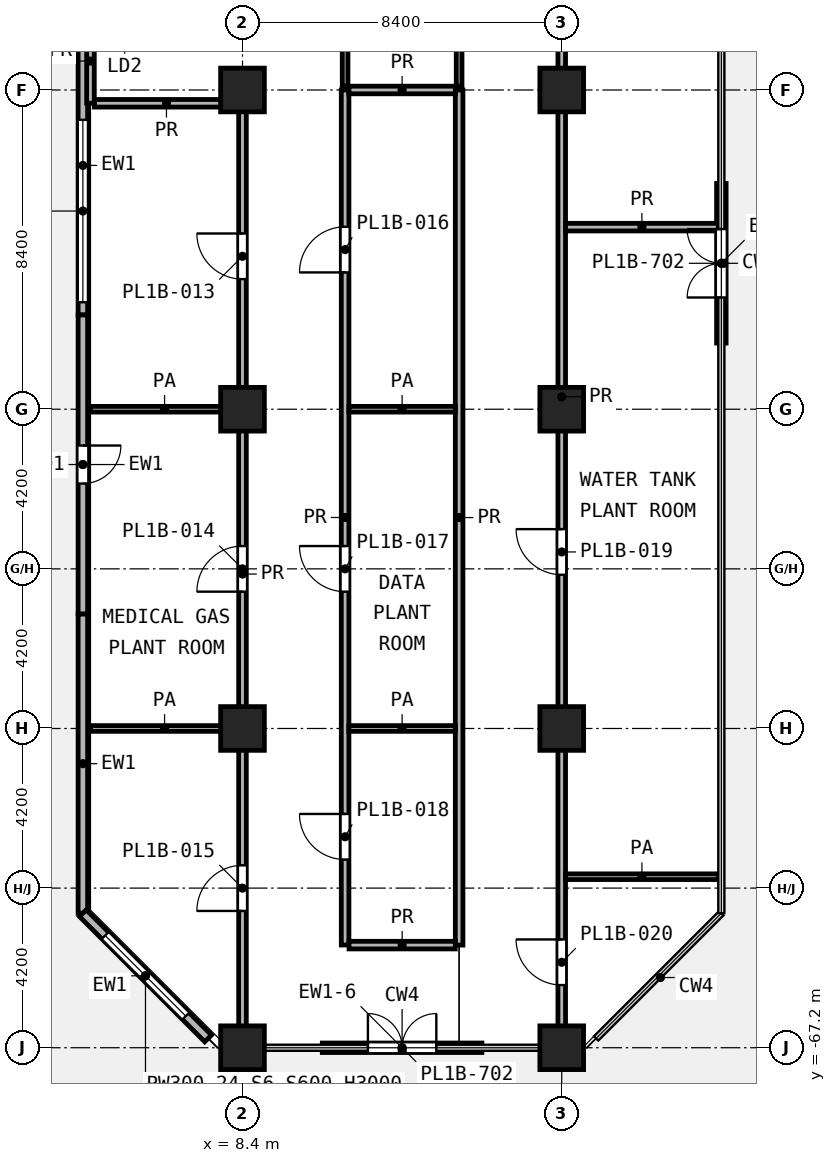
"""IFC4 building model, lengths in metres.
Left out: names, types, materials, properties, quantities, classifications, styles, units other than length and angle.
Written with IfcOpenShell. Run it as: python <this file> out.ifc"""

import sys

from ifc_helpers import new_model, si_unit, direction, frame, frame_2d, origin, origin_2d, place, context, subcontext, project, spatial, rectangle, extrude, element, fill, save


model = new_model("IFC4")
c1 = context("Model", 3, precision=1e-05, world=origin(), true_north=direction((0.0, 1.0)))
c2 = subcontext(c1, "Body", "Model", "MODEL_VIEW")
j1 = project(units=[si_unit("LENGTHUNIT", "METRE"), si_unit("PLANEANGLEUNIT", "RADIAN")], contexts=[c1])
p1 = place(None, origin())
s1 = spatial("IfcSite", under=j1, at=p1, CompositionType="ELEMENT")
p2 = place(p1, origin())
s2 = spatial("IfcBuilding", under=s1, at=p2, CompositionType="ELEMENT")
p3 = place(p2, frame((0.0, 0.0, 93.8)))
s3 = spatial("IfcBuildingStorey", under=s2, at=p3, CompositionType="ELEMENT", Elevation=93.8)
for number, where, z_axis, x_axis in (
    (1, (8.4, -42.0, 0.0), (0.0, 0.0, 1.0), (1.0, 0.0, 0.0)),
    (2, (16.8, -42.0, 0.0), (0.0, 0.0, 1.0), (1.0, 0.0, 0.0)),
    (3, (8.4, -50.4, 0.0), (0.0, 0.0, 1.0), (1.0, 0.0, 0.0)),
    (4, (16.8, -50.4, 0.0), (0.0, 0.0, 1.0), (1.0, 0.0, 0.0)),
    (5, (8.4, -58.8, 0.0), (0.0, 0.0, 1.0), (1.0, 0.0, 0.0)),
    (6, (16.8, -58.8, 0.0), (0.0, 0.0, 1.0), (1.0, 0.0, 0.0)),
    (7, (8.4, -67.2, 0.0), (0.0, 0.0, 1.0), (1.0, 0.0, 0.0)),
    (8, (16.8, -67.2, 0.0), (0.0, 0.0, 1.0), (1.0, 0.0, 0.0)),
):
    element("IfcColumn", number, at=place(p3, frame(where, z_axis=z_axis, x_axis=x_axis)), inside=s3, PredefinedType="COLUMN", context=c2, shape_type="SweptSolid", body=[
        extrude(rectangle(XDim=1.15, YDim=1.15, at=origin_2d()), origin(), (0.0, 0.0, 1.0), 5.0),
    ])
p4 = place(p3, frame((4.2, -40.05, 0.0), z_axis=(0.0, 0.0, 1.0), x_axis=(0.0, -1.0, 0.0)))
e9 = element("IfcWall", 9, at=p4, inside=s3, PredefinedType="SOLIDWALL", context=c2, shape_type="SweptSolid", body=[
    extrude(rectangle(XDim=7.87, YDim=0.25, at=frame_2d((3.935, 0.0))), origin(), (0.0, 0.0, 1.0), 4.4),
])
p5 = place(p4, frame((2.735, 0.0, 0.6)))
e10 = element("IfcOpeningElement", 10, at=p5, cuts=e9, PredefinedType="OPENING", context=c2, shape_type="SweptSolid", body=[
    extrude(rectangle(XDim=4.8, YDim=2.4, at=frame_2d((2.4, 1.2))), frame((0.0, 0.135, 0.0), z_axis=(0.0, -1.0, 0.0), x_axis=(1.0, 0.0, 0.0)), (0.0, 0.0, 1.0), 0.27),
])
p6 = place(p3, frame((4.2, -47.92, 0.0), z_axis=(0.0, 0.0, 1.0), x_axis=(0.0, -1.0, 0.0)))
e11 = element("IfcWall", 11, at=p6, inside=s3, PredefinedType="SOLIDWALL", context=c2, shape_type="SweptSolid", body=[
    extrude(rectangle(XDim=7.87, YDim=0.25, at=frame_2d((3.935, 0.0))), origin(), (0.0, 0.0, 1.0), 4.4),
])
p7 = place(p6, frame((3.435, 0.0, 0.0)))
e12 = element("IfcOpeningElement", 12, at=p7, cuts=e11, PredefinedType="OPENING", context=c2, shape_type="SweptSolid", body=[
    extrude(rectangle(XDim=1.0, YDim=2.1, at=frame_2d((0.5, 1.05))), frame((0.0, 0.135, 0.0), z_axis=(0.0, -1.0, 0.0), x_axis=(1.0, 0.0, 0.0)), (0.0, 0.0, 1.0), 0.27),
])
p8 = place(p3, frame((4.2, -55.79, 0.0), z_axis=(0.0, 0.0, 1.0), x_axis=(0.0, -1.0, 0.0)))
e13 = element("IfcWall", 13, at=p8, inside=s3, PredefinedType="SOLIDWALL", context=c2, shape_type="SweptSolid", body=[
    extrude(rectangle(XDim=7.87, YDim=0.25, at=frame_2d((3.935, 0.0))), origin(), (0.0, 0.0, 1.0), 4.4),
])
p9 = place(p3, frame((4.2, -63.66, 0.0), z_axis=(0.0, 0.0, 1.0), x_axis=(0.707106781187, -0.707106781187, 0.0)))
e14 = element("IfcWall", 14, at=p9, inside=s3, PredefinedType="SOLIDWALL", context=c2, shape_type="SweptSolid", body=[
    extrude(rectangle(XDim=4.66, YDim=0.25, at=frame_2d((2.33, 0.0))), origin(), (0.0, 0.0, 1.0), 4.4),
])
p10 = place(p9, frame((0.83, 0.0, 0.6)))
e15 = element("IfcOpeningElement", 15, at=p10, cuts=e14, PredefinedType="OPENING", context=c2, shape_type="SweptSolid", body=[
    extrude(rectangle(XDim=3.0, YDim=2.4, at=frame_2d((1.5, 1.2))), frame((0.0, 0.135, 0.0), z_axis=(0.0, -1.0, 0.0), x_axis=(1.0, 0.0, 0.0)), (0.0, 0.0, 1.0), 0.27),
])
p11 = place(p3, frame((10.5, -67.201, 0.0), z_axis=(0.0, 0.0, 1.0), x_axis=(1.0, 0.0, 0.0)))
e16 = element("IfcWall", 16, at=p11, inside=s3, PredefinedType="SOLIDWALL", context=c2, shape_type="SweptSolid", body=[
    extrude(rectangle(XDim=4.2, YDim=0.25, at=frame_2d((2.1, 0.0))), origin(), (0.0, 0.0, 1.0), 4.24),
])
p12 = place(p11, frame((1.2, 0.0, 0.0)))
e17 = element("IfcOpeningElement", 17, at=p12, cuts=e16, PredefinedType="OPENING", context=c2, shape_type="SweptSolid", body=[
    extrude(rectangle(XDim=1.8, YDim=2.1, at=frame_2d((0.9, 1.05))), frame((0.0, 0.135, 0.0), z_axis=(0.0, -1.0, 0.0), x_axis=(1.0, 0.0, 0.0)), (0.0, 0.0, 1.0), 0.27),
])
p13 = place(p3, frame((21.0, -48.66, 0.0), z_axis=(0.0, 0.0, 1.0), x_axis=(0.0, 1.0, 0.0)))
e18 = element("IfcWall", 18, at=p13, inside=s3, PredefinedType="SOLIDWALL", context=c2, shape_type="SweptSolid", body=[
    extrude(rectangle(XDim=4.2, YDim=0.25, at=frame_2d((2.1, 0.0))), origin(), (0.0, 0.0, 1.0), 4.24),
])
p14 = place(p13, frame((1.2, 0.0, 0.0)))
e19 = element("IfcOpeningElement", 19, at=p14, cuts=e18, PredefinedType="OPENING", context=c2, shape_type="SweptSolid", body=[
    extrude(rectangle(XDim=1.8, YDim=2.1, at=frame_2d((0.9, 1.05))), frame((0.0, 0.135, 0.0), z_axis=(0.0, -1.0, 0.0), x_axis=(1.0, 0.0, 0.0)), (0.0, 0.0, 1.0), 0.27),
])
p15 = place(p3, frame((16.9, -62.7, 0.0), z_axis=(0.0, 0.0, 1.0), x_axis=(1.0, 0.0, 0.0)))
e20 = element("IfcWall", 20, at=p15, inside=s3, PredefinedType="PARTITIONING", context=c2, shape_type="SweptSolid", body=[
    extrude(rectangle(XDim=4.02, YDim=0.15, at=frame_2d((2.01, 0.0))), origin(), (0.0, 0.0, 1.0), 4.4),
])
p16 = place(p3, frame((4.4, -58.8, 0.0), z_axis=(0.0, 0.0, 1.0), x_axis=(1.0, 0.0, 0.0)))
e21 = element("IfcWall", 21, at=p16, inside=s3, PredefinedType="PARTITIONING", context=c2, shape_type="SweptSolid", body=[
    extrude(rectangle(XDim=3.9, YDim=0.15, at=frame_2d((1.95, 0.0))), origin(), (0.0, 0.0, 1.0), 4.4),
])
p17 = place(p3, frame((11.2, -58.8, 0.0), z_axis=(0.0, 0.0, 1.0), x_axis=(1.0, 0.0, 0.0)))
e22 = element("IfcWall", 22, at=p17, inside=s3, PredefinedType="PARTITIONING", context=c2, shape_type="SweptSolid", body=[
    extrude(rectangle(XDim=2.8, YDim=0.15, at=frame_2d((1.4, 0.0))), origin(), (0.0, 0.0, 1.0), 4.4),
])
p18 = place(p3, frame((4.4, -50.4, 0.0), z_axis=(0.0, 0.0, 1.0), x_axis=(1.0, 0.0, 0.0)))
e23 = element("IfcWall", 23, at=p18, inside=s3, PredefinedType="PARTITIONING", context=c2, shape_type="SweptSolid", body=[
    extrude(rectangle(XDim=3.9, YDim=0.15, at=frame_2d((1.95, 0.0))), origin(), (0.0, 0.0, 1.0), 4.4),
])
p19 = place(p3, frame((11.2, -50.4, 0.0), z_axis=(0.0, 0.0, 1.0), x_axis=(1.0, 0.0, 0.0)))
e24 = element("IfcWall", 24, at=p19, inside=s3, PredefinedType="PARTITIONING", context=c2, shape_type="SweptSolid", body=[
    extrude(rectangle(XDim=2.8, YDim=0.15, at=frame_2d((1.4, 0.0))), origin(), (0.0, 0.0, 1.0), 4.4),
])
p20 = place(p3, frame((11.1, -41.9, 0.0), z_axis=(0.0, 0.0, 1.0), x_axis=(0.0, 1.0, 0.0)))
e25 = element("IfcWall", 25, at=p20, inside=s3, PredefinedType="PARTITIONING", context=c2, shape_type="SweptSolid", body=[
    extrude(rectangle(XDim=12.497, YDim=0.15, at=frame_2d((6.249, 0.0))), origin(), (0.0, 0.0, 1.0), 4.4),
])
p21 = place(p20, frame((5.699, 0.0, 0.0)))
e26 = element("IfcOpeningElement", 26, at=p21, cuts=e25, PredefinedType="OPENING", context=c2, shape_type="SweptSolid", body=[
    extrude(rectangle(XDim=1.0, YDim=2.1, at=frame_2d((0.5, 1.05))), frame((0.0, 0.085, 0.0), z_axis=(0.0, -1.0, 0.0), x_axis=(1.0, 0.0, 0.0)), (0.0, 0.0, 1.0), 0.17),
])
p22 = place(p3, frame((14.1, -41.9, 0.0), z_axis=(0.0, 0.0, 1.0), x_axis=(0.0, 1.0, 0.0)))
e27 = element("IfcWall", 27, at=p22, inside=s3, PredefinedType="PARTITIONING", context=c2, shape_type="SweptSolid", body=[
    extrude(rectangle(XDim=12.5, YDim=0.15, at=frame_2d((6.25, 0.0))), origin(), (0.0, 0.0, 1.0), 4.4),
])
p23 = place(p3, frame((11.203, -64.5, 0.0), z_axis=(0.0, 0.0, 1.0), x_axis=(1.0, 0.0, 0.0)))
e28 = element("IfcWall", 28, at=p23, inside=s3, PredefinedType="PARTITIONING", context=c2, shape_type="SweptSolid", body=[
    extrude(rectangle(XDim=2.797, YDim=0.2, at=frame_2d((1.398, 0.0))), origin(), (0.0, 0.0, 1.0), 4.4),
])
p24 = place(p3, frame((16.9, -45.609, 0.0), z_axis=(0.0, 0.0, 1.0), x_axis=(1.0, 0.0, 0.0)))
e29 = element("IfcWall", 29, at=p24, inside=s3, PredefinedType="PARTITIONING", context=c2, shape_type="SweptSolid", body=[
    extrude(rectangle(XDim=4.02, YDim=0.2, at=frame_2d((2.01, 0.0))), origin(), (0.0, 0.0, 1.0), 4.4),
])
p25 = place(p3, frame((4.501, -42.35, 0.0), z_axis=(0.0, 0.0, 1.0), x_axis=(1.0, 0.0, 0.0)))
e30 = element("IfcWall", 30, at=p25, inside=s3, PredefinedType="PARTITIONING", context=c2, shape_type="SweptSolid", body=[
    extrude(rectangle(XDim=3.797, YDim=0.2, at=frame_2d((1.898, 0.0))), origin(), (0.0, 0.0, 1.0), 4.4),
])
p26 = place(p3, frame((11.2, -42.0, 0.0), z_axis=(0.0, 0.0, 1.0), x_axis=(1.0, 0.0, 0.0)))
e31 = element("IfcWall", 31, at=p26, inside=s3, PredefinedType="PARTITIONING", context=c2, shape_type="SweptSolid", body=[
    extrude(rectangle(XDim=2.8, YDim=0.2, at=frame_2d((1.4, 0.0))), origin(), (0.0, 0.0, 1.0), 4.4),
])
p27 = place(p3, frame((4.4, -42.348, 0.0), z_axis=(0.0, 0.0, 1.0), x_axis=(0.0, 1.0, 0.0)))
e32 = element("IfcWall", 32, at=p27, inside=s3, PredefinedType="PARTITIONING", context=c2, shape_type="SweptSolid", body=[
    extrude(rectangle(XDim=2.218, YDim=0.2, at=frame_2d((1.109, 0.0))), origin(), (0.0, 0.0, 1.0), 4.4),
])
p28 = place(p3, frame((8.4, -67.121, 0.0), z_axis=(0.0, 0.0, 1.0), x_axis=(0.0, 1.0, 0.0)))
e33 = element("IfcWall", 33, at=p28, inside=s3, PredefinedType="PARTITIONING", context=c2, shape_type="SweptSolid", body=[
    extrude(rectangle(XDim=24.769, YDim=0.2, at=frame_2d((12.385, 0.0))), origin(), (0.0, 0.0, 1.0), 4.4),
])
p29 = place(p28, frame((20.145, 0.0, 0.0)))
e34 = element("IfcOpeningElement", 34, at=p29, cuts=e33, PredefinedType="OPENING", context=c2, shape_type="SweptSolid", body=[
    extrude(rectangle(XDim=1.2, YDim=2.1, at=frame_2d((0.6, 1.05))), frame((0.0, 0.11, 0.0), z_axis=(0.0, -1.0, 0.0), x_axis=(1.0, 0.0, 0.0)), (0.0, 0.0, 1.0), 0.22),
])
p30 = place(p28, frame((11.921, 0.0, 0.0)))
e35 = element("IfcOpeningElement", 35, at=p30, cuts=e33, PredefinedType="OPENING", context=c2, shape_type="SweptSolid", body=[
    extrude(rectangle(XDim=1.2, YDim=2.1, at=frame_2d((0.6, 1.05))), frame((0.0, 0.11, 0.0), z_axis=(0.0, -1.0, 0.0), x_axis=(1.0, 0.0, 0.0)), (0.0, 0.0, 1.0), 0.22),
])
p31 = place(p28, frame((3.52, 0.0, 0.0)))
e36 = element("IfcOpeningElement", 36, at=p31, cuts=e33, PredefinedType="OPENING", context=c2, shape_type="SweptSolid", body=[
    extrude(rectangle(XDim=1.2, YDim=2.1, at=frame_2d((0.6, 1.05))), frame((0.0, 0.11, 0.0), z_axis=(0.0, -1.0, 0.0), x_axis=(1.0, 0.0, 0.0)), (0.0, 0.0, 1.0), 0.22),
])
p32 = place(p3, frame((11.1, -64.497, 0.0), z_axis=(0.0, 0.0, 1.0), x_axis=(0.0, 1.0, 0.0)))
e37 = element("IfcWall", 37, at=p32, inside=s3, PredefinedType="PARTITIONING", context=c2, shape_type="SweptSolid", body=[
    extrude(rectangle(XDim=22.497, YDim=0.2, at=frame_2d((11.249, 0.0))), origin(), (0.0, 0.0, 1.0), 4.4),
])
p33 = place(p32, frame((17.697, 0.0, 0.0)))
e38 = element("IfcOpeningElement", 38, at=p33, cuts=e37, PredefinedType="OPENING", context=c2, shape_type="SweptSolid", body=[
    extrude(rectangle(XDim=1.2, YDim=2.1, at=frame_2d((0.6, 1.05))), frame((0.0, 0.11, 0.0), z_axis=(0.0, -1.0, 0.0), x_axis=(1.0, 0.0, 0.0)), (0.0, 0.0, 1.0), 0.22),
])
p34 = place(p32, frame((9.297, 0.0, 0.0)))
e39 = element("IfcOpeningElement", 39, at=p34, cuts=e37, PredefinedType="OPENING", context=c2, shape_type="SweptSolid", body=[
    extrude(rectangle(XDim=1.2, YDim=2.1, at=frame_2d((0.6, 1.05))), frame((0.0, 0.11, 0.0), z_axis=(0.0, -1.0, 0.0), x_axis=(1.0, 0.0, 0.0)), (0.0, 0.0, 1.0), 0.22),
])
p35 = place(p32, frame((2.248, 0.0, 0.0)))
e40 = element("IfcOpeningElement", 40, at=p35, cuts=e37, PredefinedType="OPENING", context=c2, shape_type="SweptSolid", body=[
    extrude(rectangle(XDim=1.2, YDim=2.1, at=frame_2d((0.6, 1.05))), frame((0.0, 0.11, 0.0), z_axis=(0.0, -1.0, 0.0), x_axis=(1.0, 0.0, 0.0)), (0.0, 0.0, 1.0), 0.22),
])
p36 = place(p3, frame((14.1, -64.5, 0.0), z_axis=(0.0, 0.0, 1.0), x_axis=(0.0, 1.0, 0.0)))
e41 = element("IfcWall", 41, at=p36, inside=s3, PredefinedType="PARTITIONING", context=c2, shape_type="SweptSolid", body=[
    extrude(rectangle(XDim=22.5, YDim=0.2, at=frame_2d((11.25, 0.0))), origin(), (0.0, 0.0, 1.0), 4.4),
])
p37 = place(p3, frame((16.8, -67.121, 0.0), z_axis=(0.0, 0.0, 1.0), x_axis=(0.0, 1.0, 0.0)))
e42 = element("IfcWall", 42, at=p37, inside=s3, PredefinedType="PARTITIONING", context=c2, shape_type="SweptSolid", body=[
    extrude(rectangle(XDim=34.096, YDim=0.2, at=frame_2d((17.048, 0.0))), origin(), (0.0, 0.0, 1.0), 4.4),
])
p38 = place(p37, frame((29.016, 0.0, 0.0)))
e43 = element("IfcOpeningElement", 43, at=p38, cuts=e42, PredefinedType="OPENING", context=c2, shape_type="SweptSolid", body=[
    extrude(rectangle(XDim=1.2, YDim=2.1, at=frame_2d((0.6, 1.05))), frame((0.0, 0.11, 0.0), z_axis=(0.0, -1.0, 0.0), x_axis=(1.0, 0.0, 0.0)), (0.0, 0.0, 1.0), 0.22),
])
p39 = place(p37, frame((12.366, 0.0, 0.0)))
e44 = element("IfcOpeningElement", 44, at=p39, cuts=e42, PredefinedType="OPENING", context=c2, shape_type="SweptSolid", body=[
    extrude(rectangle(XDim=1.2, YDim=2.1, at=frame_2d((0.6, 1.05))), frame((0.0, 0.11, 0.0), z_axis=(0.0, -1.0, 0.0), x_axis=(1.0, 0.0, 0.0)), (0.0, 0.0, 1.0), 0.22),
])
p40 = place(p37, frame((1.57, 0.0, 0.0)))
e45 = element("IfcOpeningElement", 45, at=p40, cuts=e42, PredefinedType="OPENING", context=c2, shape_type="SweptSolid", body=[
    extrude(rectangle(XDim=1.2, YDim=2.1, at=frame_2d((0.6, 1.05))), frame((0.0, 0.11, 0.0), z_axis=(0.0, -1.0, 0.0), x_axis=(1.0, 0.0, 0.0)), (0.0, 0.0, 1.0), 0.22),
])
p41 = place(p5, origin())
e46 = element("IfcWindow", 46, at=p41, inside=s3, PartitioningType="SINGLE_PANEL", PredefinedType="WINDOW", context=c2, shape_type="SweptSolid", body=[
    extrude(rectangle(XDim=4.8, YDim=2.4, at=frame_2d((2.4, 1.2))), frame((0.0, 0.03, 0.0), z_axis=(0.0, -1.0, 0.0), x_axis=(1.0, 0.0, 0.0)), (0.0, 0.0, 1.0), 0.06),
])
fill(e10, e46)
p42 = place(p7, origin())
e47 = element("IfcDoor", 47, at=p42, inside=s3, OperationType="SINGLE_SWING_LEFT", PredefinedType="DOOR", context=c2, shape_type="SweptSolid", body=[
    extrude(rectangle(XDim=1.0, YDim=2.1, at=frame_2d((0.5, 1.05))), frame((0.0, 0.025, 0.0), z_axis=(0.0, -1.0, 0.0), x_axis=(1.0, 0.0, 0.0)), (0.0, 0.0, 1.0), 0.05),
])
fill(e12, e47)
p43 = place(p10, origin())
e48 = element("IfcWindow", 48, at=p43, inside=s3, PartitioningType="SINGLE_PANEL", PredefinedType="WINDOW", context=c2, shape_type="SweptSolid", body=[
    extrude(rectangle(XDim=3.0, YDim=2.4, at=frame_2d((1.5, 1.2))), frame((0.0, 0.03, 0.0), z_axis=(0.0, -1.0, 0.0), x_axis=(1.0, 0.0, 0.0)), (0.0, 0.0, 1.0), 0.06),
])
fill(e15, e48)
p44 = place(p12, origin())
e49 = element("IfcDoor", 49, at=p44, inside=s3, OperationType="DOUBLE_DOOR_SINGLE_SWING", PredefinedType="DOOR", context=c2, shape_type="SweptSolid", body=[
    extrude(rectangle(XDim=1.8, YDim=2.1, at=frame_2d((0.9, 1.05))), frame((0.0, 0.025, 0.0), z_axis=(0.0, -1.0, 0.0), x_axis=(1.0, 0.0, 0.0)), (0.0, 0.0, 1.0), 0.05),
])
fill(e17, e49)
p45 = place(p14, origin())
e50 = element("IfcDoor", 50, at=p45, inside=s3, OperationType="DOUBLE_DOOR_SINGLE_SWING", PredefinedType="DOOR", context=c2, shape_type="SweptSolid", body=[
    extrude(rectangle(XDim=1.8, YDim=2.1, at=frame_2d((0.9, 1.05))), frame((0.0, 0.025, 0.0), z_axis=(0.0, -1.0, 0.0), x_axis=(1.0, 0.0, 0.0)), (0.0, 0.0, 1.0), 0.05),
])
fill(e19, e50)
p46 = place(p29, origin())
e51 = element("IfcDoor", 51, at=p46, inside=s3, OperationType="SINGLE_SWING_RIGHT", PredefinedType="DOOR", context=c2, shape_type="SweptSolid", body=[
    extrude(rectangle(XDim=1.2, YDim=2.1, at=frame_2d((0.6, 1.05))), frame((0.0, 0.025, 0.0), z_axis=(0.0, -1.0, 0.0), x_axis=(1.0, 0.0, 0.0)), (0.0, 0.0, 1.0), 0.05),
])
fill(e34, e51)
p47 = place(p30, origin())
e52 = element("IfcDoor", 52, at=p47, inside=s3, OperationType="SINGLE_SWING_LEFT", PredefinedType="DOOR", context=c2, shape_type="SweptSolid", body=[
    extrude(rectangle(XDim=1.2, YDim=2.1, at=frame_2d((0.6, 1.05))), frame((0.0, 0.025, 0.0), z_axis=(0.0, -1.0, 0.0), x_axis=(1.0, 0.0, 0.0)), (0.0, 0.0, 1.0), 0.05),
])
fill(e35, e52)
p48 = place(p31, origin())
e53 = element("IfcDoor", 53, at=p48, inside=s3, OperationType="SINGLE_SWING_LEFT", PredefinedType="DOOR", context=c2, shape_type="SweptSolid", body=[
    extrude(rectangle(XDim=1.2, YDim=2.1, at=frame_2d((0.6, 1.05))), frame((0.0, 0.025, 0.0), z_axis=(0.0, -1.0, 0.0), x_axis=(1.0, 0.0, 0.0)), (0.0, 0.0, 1.0), 0.05),
])
fill(e36, e53)
p49 = place(p33, origin())
e54 = element("IfcDoor", 54, at=p49, inside=s3, OperationType="SINGLE_SWING_LEFT", PredefinedType="DOOR", context=c2, shape_type="SweptSolid", body=[
    extrude(rectangle(XDim=1.2, YDim=2.1, at=frame_2d((0.6, 1.05))), frame((0.0, 0.025, 0.0), z_axis=(0.0, -1.0, 0.0), x_axis=(1.0, 0.0, 0.0)), (0.0, 0.0, 1.0), 0.05),
])
fill(e38, e54)
p50 = place(p34, origin())
e55 = element("IfcDoor", 55, at=p50, inside=s3, OperationType="SINGLE_SWING_RIGHT", PredefinedType="DOOR", context=c2, shape_type="SweptSolid", body=[
    extrude(rectangle(XDim=1.2, YDim=2.1, at=frame_2d((0.6, 1.05))), frame((0.0, 0.025, 0.0), z_axis=(0.0, -1.0, 0.0), x_axis=(1.0, 0.0, 0.0)), (0.0, 0.0, 1.0), 0.05),
])
fill(e39, e55)
p51 = place(p35, origin())
e56 = element("IfcDoor", 56, at=p51, inside=s3, OperationType="SINGLE_SWING_RIGHT", PredefinedType="DOOR", context=c2, shape_type="SweptSolid", body=[
    extrude(rectangle(XDim=1.2, YDim=2.1, at=frame_2d((0.6, 1.05))), frame((0.0, 0.025, 0.0), z_axis=(0.0, -1.0, 0.0), x_axis=(1.0, 0.0, 0.0)), (0.0, 0.0, 1.0), 0.05),
])
fill(e40, e56)
p52 = place(p39, origin())
e57 = element("IfcDoor", 57, at=p52, inside=s3, OperationType="SINGLE_SWING_RIGHT", PredefinedType="DOOR", context=c2, shape_type="SweptSolid", body=[
    extrude(rectangle(XDim=1.2, YDim=2.1, at=frame_2d((0.6, 1.05))), frame((0.0, 0.025, 0.0), z_axis=(0.0, -1.0, 0.0), x_axis=(1.0, 0.0, 0.0)), (0.0, 0.0, 1.0), 0.05),
])
fill(e44, e57)
p53 = place(p40, origin())
e58 = element("IfcDoor", 58, at=p53, inside=s3, OperationType="SINGLE_SWING_RIGHT", PredefinedType="DOOR", context=c2, shape_type="SweptSolid", body=[
    extrude(rectangle(XDim=1.2, YDim=2.1, at=frame_2d((0.6, 1.05))), frame((0.0, 0.025, 0.0), z_axis=(0.0, -1.0, 0.0), x_axis=(1.0, 0.0, 0.0)), (0.0, 0.0, 1.0), 0.05),
])
fill(e45, e58)
save(model, sys.argv[1])
